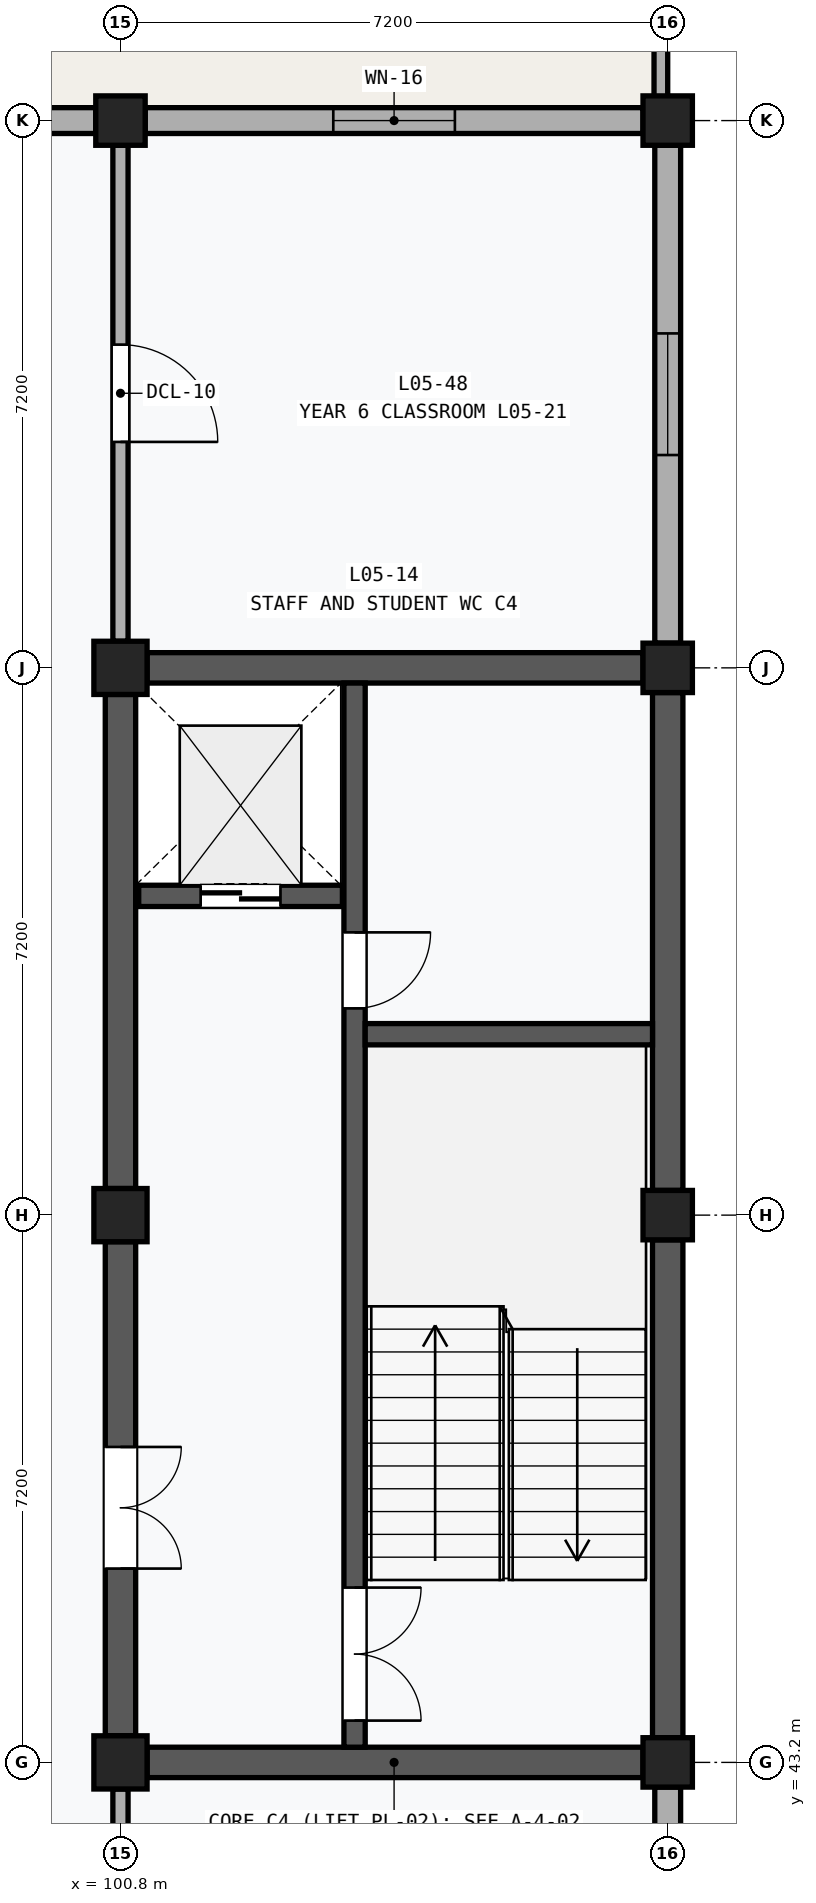
"""IFC4 building model, lengths in metres.
Left out: names, types, materials, properties, quantities, classifications, styles, units other than length and angle.
Written with IfcOpenShell. Run it as: python <this file> out.ifc"""

import sys

from ifc_helpers import new_model, si_unit, direction, frame, frame_2d, origin, origin_2d, place, context, subcontext, project, spatial, rectangle, extrude, element, fill, save


model = new_model("IFC4")
c1 = context("Model", 3, precision=1e-05, world=origin(), true_north=direction((0.0, 1.0)))
c2 = subcontext(c1, "Body", "Model", "MODEL_VIEW")
j1 = project(units=[si_unit("LENGTHUNIT", "METRE"), si_unit("PLANEANGLEUNIT", "RADIAN")], contexts=[c1])
p1 = place(None, origin())
s1 = spatial("IfcSite", under=j1, at=p1, CompositionType="ELEMENT")
p2 = place(p1, origin())
s2 = spatial("IfcBuilding", under=s1, at=p2, CompositionType="ELEMENT")
p3 = place(p2, frame((0.0, 0.0, 22.6)))
s3 = spatial("IfcBuildingStorey", under=s2, at=p3, CompositionType="ELEMENT", Elevation=22.6)
for number, where, z_axis, x_axis in (
    (1, (100.8, 43.2, 0.0), (0.0, 0.0, 1.0), (1.0, 0.0, 0.0)),
    (2, (100.8, 50.4, 0.0), (0.0, 0.0, 1.0), (1.0, 0.0, 0.0)),
    (3, (100.8, 57.6, 0.0), (0.0, 0.0, 1.0), (1.0, 0.0, 0.0)),
):
    element("IfcColumn", number, at=place(p3, frame(where, z_axis=z_axis, x_axis=x_axis)), inside=s3, PredefinedType="COLUMN", context=c2, shape_type="SweptSolid", body=[
        extrude(rectangle(XDim=0.7, YDim=0.7, at=origin_2d()), origin(), (0.0, 0.0, 1.0), 4.0),
    ])
for number, where, z_axis, x_axis in (
    (4, (100.8, 64.8, 0.0), (0.0, 0.0, 1.0), (1.0, 0.0, 0.0)),
    (5, (108.0, 43.2, 0.0), (0.0, 0.0, 1.0), (1.0, 0.0, 0.0)),
    (6, (108.0, 50.4, 0.0), (0.0, 0.0, 1.0), (1.0, 0.0, 0.0)),
    (7, (108.0, 57.6, 0.0), (0.0, 0.0, 1.0), (1.0, 0.0, 0.0)),
    (8, (108.0, 64.8, 0.0), (0.0, 0.0, 1.0), (1.0, 0.0, 0.0)),
):
    element("IfcColumn", number, at=place(p3, frame(where, z_axis=z_axis, x_axis=x_axis)), inside=s3, PredefinedType="COLUMN", context=c2, shape_type="SweptSolid", body=[
        extrude(rectangle(XDim=0.65, YDim=0.65, at=origin_2d()), origin(), (0.0, 0.0, 1.0), 4.0),
    ])
p4 = place(p3, frame((93.925, 64.8, 0.0), z_axis=(0.0, 0.0, 1.0), x_axis=(1.0, 0.0, 0.0)))
e9 = element("IfcWall", 9, at=p4, inside=s3, PredefinedType="SOLIDWALL", context=c2, shape_type="SweptSolid", body=[
    extrude(rectangle(XDim=6.55, YDim=0.34, at=frame_2d((3.275, 0.0))), origin(), (0.0, 0.0, 1.0), 3.12),
])
p5 = place(p4, frame((2.525, 0.0, 1.1)))
e10 = element("IfcOpeningElement", 10, at=p5, cuts=e9, PredefinedType="OPENING", context=c2, shape_type="SweptSolid", body=[
    extrude(rectangle(XDim=1.5, YDim=1.35, at=frame_2d((0.75, 0.675))), frame((0.0, 0.182, 0.0), z_axis=(0.0, -1.0, 0.0), x_axis=(1.0, 0.0, 0.0)), (0.0, 0.0, 1.0), 0.364),
])
p6 = place(p3, frame((108.0, 36.375, 0.0), z_axis=(0.0, 0.0, 1.0), x_axis=(0.0, 1.0, 0.0)))
e11 = element("IfcWall", 11, at=p6, inside=s3, PredefinedType="SOLIDWALL", context=c2, shape_type="SweptSolid", body=[
    extrude(rectangle(XDim=6.5, YDim=0.34, at=frame_2d((3.25, 0.0))), origin(), (0.0, 0.0, 1.0), 3.12),
])
p7 = place(p6, frame((2.5, 0.0, 1.1)))
e12 = element("IfcOpeningElement", 12, at=p7, cuts=e11, PredefinedType="OPENING", context=c2, shape_type="SweptSolid", body=[
    extrude(rectangle(XDim=1.5, YDim=1.35, at=frame_2d((0.75, 0.675))), frame((0.0, 0.182, 0.0), z_axis=(0.0, -1.0, 0.0), x_axis=(1.0, 0.0, 0.0)), (0.0, 0.0, 1.0), 0.364),
])
p8 = place(p3, frame((101.125, 64.8, 0.0), z_axis=(0.0, 0.0, 1.0), x_axis=(1.0, 0.0, 0.0)))
e13 = element("IfcWall", 13, at=p8, inside=s3, PredefinedType="SOLIDWALL", context=c2, shape_type="SweptSolid", body=[
    extrude(rectangle(XDim=6.55, YDim=0.34, at=frame_2d((3.275, 0.0))), origin(), (0.0, 0.0, 1.0), 3.12),
])
p9 = place(p8, frame((2.475, 0.0, 1.1)))
e14 = element("IfcOpeningElement", 14, at=p9, cuts=e13, PredefinedType="OPENING", context=c2, shape_type="SweptSolid", body=[
    extrude(rectangle(XDim=1.6, YDim=1.5, at=frame_2d((0.8, 0.75))), frame((0.0, 0.182, 0.0), z_axis=(0.0, -1.0, 0.0), x_axis=(1.0, 0.0, 0.0)), (0.0, 0.0, 1.0), 0.364),
])
p10 = place(p3, frame((108.0, 57.925, 0.0), z_axis=(0.0, 0.0, 1.0), x_axis=(0.0, 1.0, 0.0)))
e15 = element("IfcWall", 15, at=p10, inside=s3, PredefinedType="SOLIDWALL", context=c2, shape_type="SweptSolid", body=[
    extrude(rectangle(XDim=6.55, YDim=0.34, at=frame_2d((3.275, 0.0))), origin(), (0.0, 0.0, 1.0), 3.12),
])
p11 = place(p10, frame((2.475, 0.0, 1.1)))
e16 = element("IfcOpeningElement", 16, at=p11, cuts=e15, PredefinedType="OPENING", context=c2, shape_type="SweptSolid", body=[
    extrude(rectangle(XDim=1.6, YDim=1.5, at=frame_2d((0.8, 0.75))), frame((0.0, 0.182, 0.0), z_axis=(0.0, -1.0, 0.0), x_axis=(1.0, 0.0, 0.0)), (0.0, 0.0, 1.0), 0.364),
])
p12 = place(p3, frame((107.91, 64.89, 0.0), z_axis=(0.0, 0.0, 1.0), x_axis=(0.0, 1.0, 0.0)))
e17 = element("IfcWall", 17, at=p12, inside=s3, PredefinedType="PARAPET", context=c2, shape_type="SweptSolid", body=[
    extrude(rectangle(XDim=7.02, YDim=0.18, at=frame_2d((3.51, 0.0))), origin(), (0.0, 0.0, 1.0), 0.95),
])
p13 = place(p3, frame((100.8, 43.55, 0.0), z_axis=(0.0, 0.0, 1.0), x_axis=(0.0, 1.0, 0.0)))
e18 = element("IfcWall", 18, at=p13, inside=s3, PredefinedType="SHEAR", context=c2, shape_type="SweptSolid", body=[
    extrude(rectangle(XDim=6.5, YDim=0.4, at=frame_2d((3.25, 0.0))), origin(), (0.0, 0.0, 1.0), 2.98),
])
p14 = place(p13, frame((2.2, 0.0, 0.0)))
e19 = element("IfcOpeningElement", 19, at=p14, cuts=e18, PredefinedType="OPENING", context=c2, shape_type="SweptSolid", body=[
    extrude(rectangle(XDim=1.6, YDim=2.2, at=frame_2d((0.8, 1.1))), frame((0.0, 0.212, 0.0), z_axis=(0.0, -1.0, 0.0), x_axis=(1.0, 0.0, 0.0)), (0.0, 0.0, 1.0), 0.424),
])
p15 = place(p3, frame((100.8, 50.75, 0.0), z_axis=(0.0, 0.0, 1.0), x_axis=(0.0, 1.0, 0.0)))
e20 = element("IfcWall", 20, at=p15, inside=s3, PredefinedType="SHEAR", context=c2, shape_type="SweptSolid", body=[
    extrude(rectangle(XDim=6.5, YDim=0.4, at=frame_2d((3.25, 0.0))), origin(), (0.0, 0.0, 1.0), 2.98),
])
p16 = place(p3, frame((108.0, 43.525, 0.0), z_axis=(0.0, 0.0, 1.0), x_axis=(0.0, 1.0, 0.0)))
e21 = element("IfcWall", 21, at=p16, inside=s3, PredefinedType="SHEAR", context=c2, shape_type="SweptSolid", body=[
    extrude(rectangle(XDim=6.55, YDim=0.4, at=frame_2d((3.275, 0.0))), origin(), (0.0, 0.0, 1.0), 3.12),
])
p17 = place(p3, frame((108.0, 50.725, 0.0), z_axis=(0.0, 0.0, 1.0), x_axis=(0.0, 1.0, 0.0)))
e22 = element("IfcWall", 22, at=p17, inside=s3, PredefinedType="SHEAR", context=c2, shape_type="SweptSolid", body=[
    extrude(rectangle(XDim=6.55, YDim=0.4, at=frame_2d((3.275, 0.0))), origin(), (0.0, 0.0, 1.0), 3.12),
])
p18 = place(p3, frame((101.15, 43.2, 0.0), z_axis=(0.0, 0.0, 1.0), x_axis=(1.0, 0.0, 0.0)))
e23 = element("IfcWall", 23, at=p18, inside=s3, PredefinedType="SHEAR", context=c2, shape_type="SweptSolid", body=[
    extrude(rectangle(XDim=6.525, YDim=0.4, at=frame_2d((3.263, 0.0))), origin(), (0.0, 0.0, 1.0), 3.05),
])
p19 = place(p3, frame((101.15, 57.6, 0.0), z_axis=(0.0, 0.0, 1.0), x_axis=(1.0, 0.0, 0.0)))
e24 = element("IfcWall", 24, at=p19, inside=s3, PredefinedType="SHEAR", context=c2, shape_type="SweptSolid", body=[
    extrude(rectangle(XDim=6.525, YDim=0.4, at=frame_2d((3.263, 0.0))), origin(), (0.0, 0.0, 1.0), 2.98),
])
p20 = place(p3, frame((103.88, 43.4, 0.0), z_axis=(0.0, 0.0, 1.0), x_axis=(0.0, 1.0, 0.0)))
e25 = element("IfcWall", 25, at=p20, inside=s3, PredefinedType="SHEAR", context=c2, shape_type="SweptSolid", body=[
    extrude(rectangle(XDim=14.0, YDim=0.28, at=frame_2d((7.0, 0.0))), origin(), (0.0, 0.0, 1.0), 3.75),
])
p21 = place(p20, frame((0.35, 0.0, 0.0)))
e26 = element("IfcOpeningElement", 26, at=p21, cuts=e25, PredefinedType="OPENING", context=c2, shape_type="SweptSolid", body=[
    extrude(rectangle(XDim=1.75, YDim=2.15, at=frame_2d((0.875, 1.075))), frame((0.0, 0.152, 0.0), z_axis=(0.0, -1.0, 0.0), x_axis=(1.0, 0.0, 0.0)), (0.0, 0.0, 1.0), 0.304),
])
p22 = place(p20, frame((9.72, 0.0, 0.0)))
e27 = element("IfcOpeningElement", 27, at=p22, cuts=e25, PredefinedType="OPENING", context=c2, shape_type="SweptSolid", body=[
    extrude(rectangle(XDim=1.0, YDim=2.15, at=frame_2d((0.5, 1.075))), frame((0.0, 0.152, 0.0), z_axis=(0.0, -1.0, 0.0), x_axis=(1.0, 0.0, 0.0)), (0.0, 0.0, 1.0), 0.304),
])
p23 = place(p3, frame((104.02, 52.78, 0.0), z_axis=(0.0, 0.0, 1.0), x_axis=(1.0, 0.0, 0.0)))
e28 = element("IfcWall", 28, at=p23, inside=s3, PredefinedType="SHEAR", context=c2, shape_type="SweptSolid", body=[
    extrude(rectangle(XDim=3.78, YDim=0.28, at=frame_2d((1.89, 0.0))), origin(), (0.0, 0.0, 1.0), 3.75),
])
p24 = place(p3, frame((101.04, 54.6, 0.0), z_axis=(0.0, 0.0, 1.0), x_axis=(1.0, 0.0, 0.0)))
e29 = element("IfcWall", 29, at=p24, inside=s3, PredefinedType="SHEAR", context=c2, shape_type="SweptSolid", body=[
    extrude(rectangle(XDim=2.68, YDim=0.28, at=frame_2d((1.34, 0.0))), origin(), (0.0, 0.0, 1.0), 3.75),
])
p25 = place(p24, frame((0.815, 0.0, 0.0)))
e30 = element("IfcOpeningElement", 30, at=p25, cuts=e29, PredefinedType="OPENING", context=c2, shape_type="SweptSolid", body=[
    extrude(rectangle(XDim=1.05, YDim=2.2, at=frame_2d((0.525, 1.1))), frame((0.0, 0.152, 0.0), z_axis=(0.0, -1.0, 0.0), x_axis=(1.0, 0.0, 0.0)), (0.0, 0.0, 1.0), 0.304),
])
p26 = place(p3, frame((100.8, 36.35, 0.0), z_axis=(0.0, 0.0, 1.0), x_axis=(0.0, 1.0, 0.0)))
e31 = element("IfcWall", 31, at=p26, inside=s3, PredefinedType="PARTITIONING", context=c2, shape_type="SweptSolid", body=[
    extrude(rectangle(XDim=6.5, YDim=0.2, at=frame_2d((3.25, 0.0))), origin(), (0.0, 0.0, 1.0), 2.98),
])
p27 = place(p26, frame((2.63, 0.0, 0.0)))
e32 = element("IfcOpeningElement", 32, at=p27, cuts=e31, PredefinedType="OPENING", context=c2, shape_type="SweptSolid", body=[
    extrude(rectangle(XDim=1.24, YDim=2.26, at=frame_2d((0.62, 1.13))), frame((0.0, 0.112, 0.0), z_axis=(0.0, -1.0, 0.0), x_axis=(1.0, 0.0, 0.0)), (0.0, 0.0, 1.0), 0.224),
])
p28 = place(p3, frame((100.8, 57.95, 0.0), z_axis=(0.0, 0.0, 1.0), x_axis=(0.0, 1.0, 0.0)))
e33 = element("IfcWall", 33, at=p28, inside=s3, PredefinedType="PARTITIONING", context=c2, shape_type="SweptSolid", body=[
    extrude(rectangle(XDim=6.525, YDim=0.2, at=frame_2d((3.263, 0.0))), origin(), (0.0, 0.0, 1.0), 2.98),
])
p29 = place(p28, frame((2.623, 0.0, 0.0)))
e34 = element("IfcOpeningElement", 34, at=p29, cuts=e33, PredefinedType="OPENING", context=c2, shape_type="SweptSolid", body=[
    extrude(rectangle(XDim=1.28, YDim=2.28, at=frame_2d((0.64, 1.14))), frame((0.0, 0.112, 0.0), z_axis=(0.0, -1.0, 0.0), x_axis=(1.0, 0.0, 0.0)), (0.0, 0.0, 1.0), 0.224),
])
p30 = place(p9, origin())
e35 = element("IfcWindow", 35, at=p30, inside=s3, PartitioningType="SINGLE_PANEL", PredefinedType="WINDOW", context=c2, shape_type="SweptSolid", body=[
    extrude(rectangle(XDim=1.6, YDim=1.5, at=frame_2d((0.8, 0.75))), frame((0.0, 0.03, 0.0), z_axis=(0.0, -1.0, 0.0), x_axis=(1.0, 0.0, 0.0)), (0.0, 0.0, 1.0), 0.06),
])
fill(e14, e35)
p31 = place(p11, origin())
e36 = element("IfcWindow", 36, at=p31, inside=s3, PartitioningType="SINGLE_PANEL", PredefinedType="WINDOW", context=c2, shape_type="SweptSolid", body=[
    extrude(rectangle(XDim=1.6, YDim=1.5, at=frame_2d((0.8, 0.75))), frame((0.0, 0.03, 0.0), z_axis=(0.0, -1.0, 0.0), x_axis=(1.0, 0.0, 0.0)), (0.0, 0.0, 1.0), 0.06),
])
fill(e16, e36)
p32 = place(p14, frame((1.6, 0.0, 0.0), z_axis=(0.0, 0.0, 1.0), x_axis=(-1.0, 0.0, 0.0)))
e37 = element("IfcDoor", 37, at=p32, inside=s3, OperationType="DOUBLE_DOOR_SINGLE_SWING", PredefinedType="DOOR", context=c2, shape_type="SweptSolid", body=[
    extrude(rectangle(XDim=1.6, YDim=2.2, at=frame_2d((0.8, 1.1))), frame((0.0, 0.025, 0.0), z_axis=(0.0, -1.0, 0.0), x_axis=(1.0, 0.0, 0.0)), (0.0, 0.0, 1.0), 0.05),
])
fill(e19, e37)
p33 = place(p21, frame((1.75, 0.0, 0.0), z_axis=(0.0, 0.0, 1.0), x_axis=(-1.0, 0.0, 0.0)))
e38 = element("IfcDoor", 38, at=p33, inside=s3, OperationType="DOUBLE_DOOR_SINGLE_SWING", PredefinedType="DOOR", context=c2, shape_type="SweptSolid", body=[
    extrude(rectangle(XDim=1.75, YDim=2.15, at=frame_2d((0.875, 1.075))), frame((0.0, 0.025, 0.0), z_axis=(0.0, -1.0, 0.0), x_axis=(1.0, 0.0, 0.0)), (0.0, 0.0, 1.0), 0.05),
])
fill(e26, e38)
p34 = place(p22, frame((1.0, 0.0, 0.0), z_axis=(0.0, 0.0, 1.0), x_axis=(-1.0, 0.0, 0.0)))
e39 = element("IfcDoor", 39, at=p34, inside=s3, OperationType="SINGLE_SWING_LEFT", PredefinedType="DOOR", context=c2, shape_type="SweptSolid", body=[
    extrude(rectangle(XDim=1.0, YDim=2.15, at=frame_2d((0.5, 1.075))), frame((0.0, 0.025, 0.0), z_axis=(0.0, -1.0, 0.0), x_axis=(1.0, 0.0, 0.0)), (0.0, 0.0, 1.0), 0.05),
])
fill(e27, e39)
p35 = place(p25, frame((1.05, 0.0, 0.0), z_axis=(0.0, 0.0, 1.0), x_axis=(-1.0, 0.0, 0.0)))
e40 = element("IfcDoor", 40, at=p35, inside=s3, OperationType="DOUBLE_DOOR_SLIDING", PredefinedType="DOOR", context=c2, shape_type="SweptSolid", body=[
    extrude(rectangle(XDim=1.05, YDim=2.2, at=frame_2d((0.525, 1.1))), frame((0.0, 0.025, 0.0), z_axis=(0.0, -1.0, 0.0), x_axis=(1.0, 0.0, 0.0)), (0.0, 0.0, 1.0), 0.05),
])
fill(e30, e40)
p36 = place(p29, frame((1.28, 0.0, 0.0), z_axis=(0.0, 0.0, 1.0), x_axis=(-1.0, 0.0, 0.0)))
e41 = element("IfcDoor", 41, at=p36, inside=s3, OperationType="SINGLE_SWING_RIGHT", PredefinedType="DOOR", context=c2, shape_type="SweptSolid", body=[
    extrude(rectangle(XDim=1.28, YDim=2.28, at=frame_2d((0.64, 1.14))), frame((0.0, 0.025, 0.0), z_axis=(0.0, -1.0, 0.0), x_axis=(1.0, 0.0, 0.0)), (0.0, 0.0, 1.0), 0.05),
])
fill(e34, e41)
save(model, sys.argv[1])
